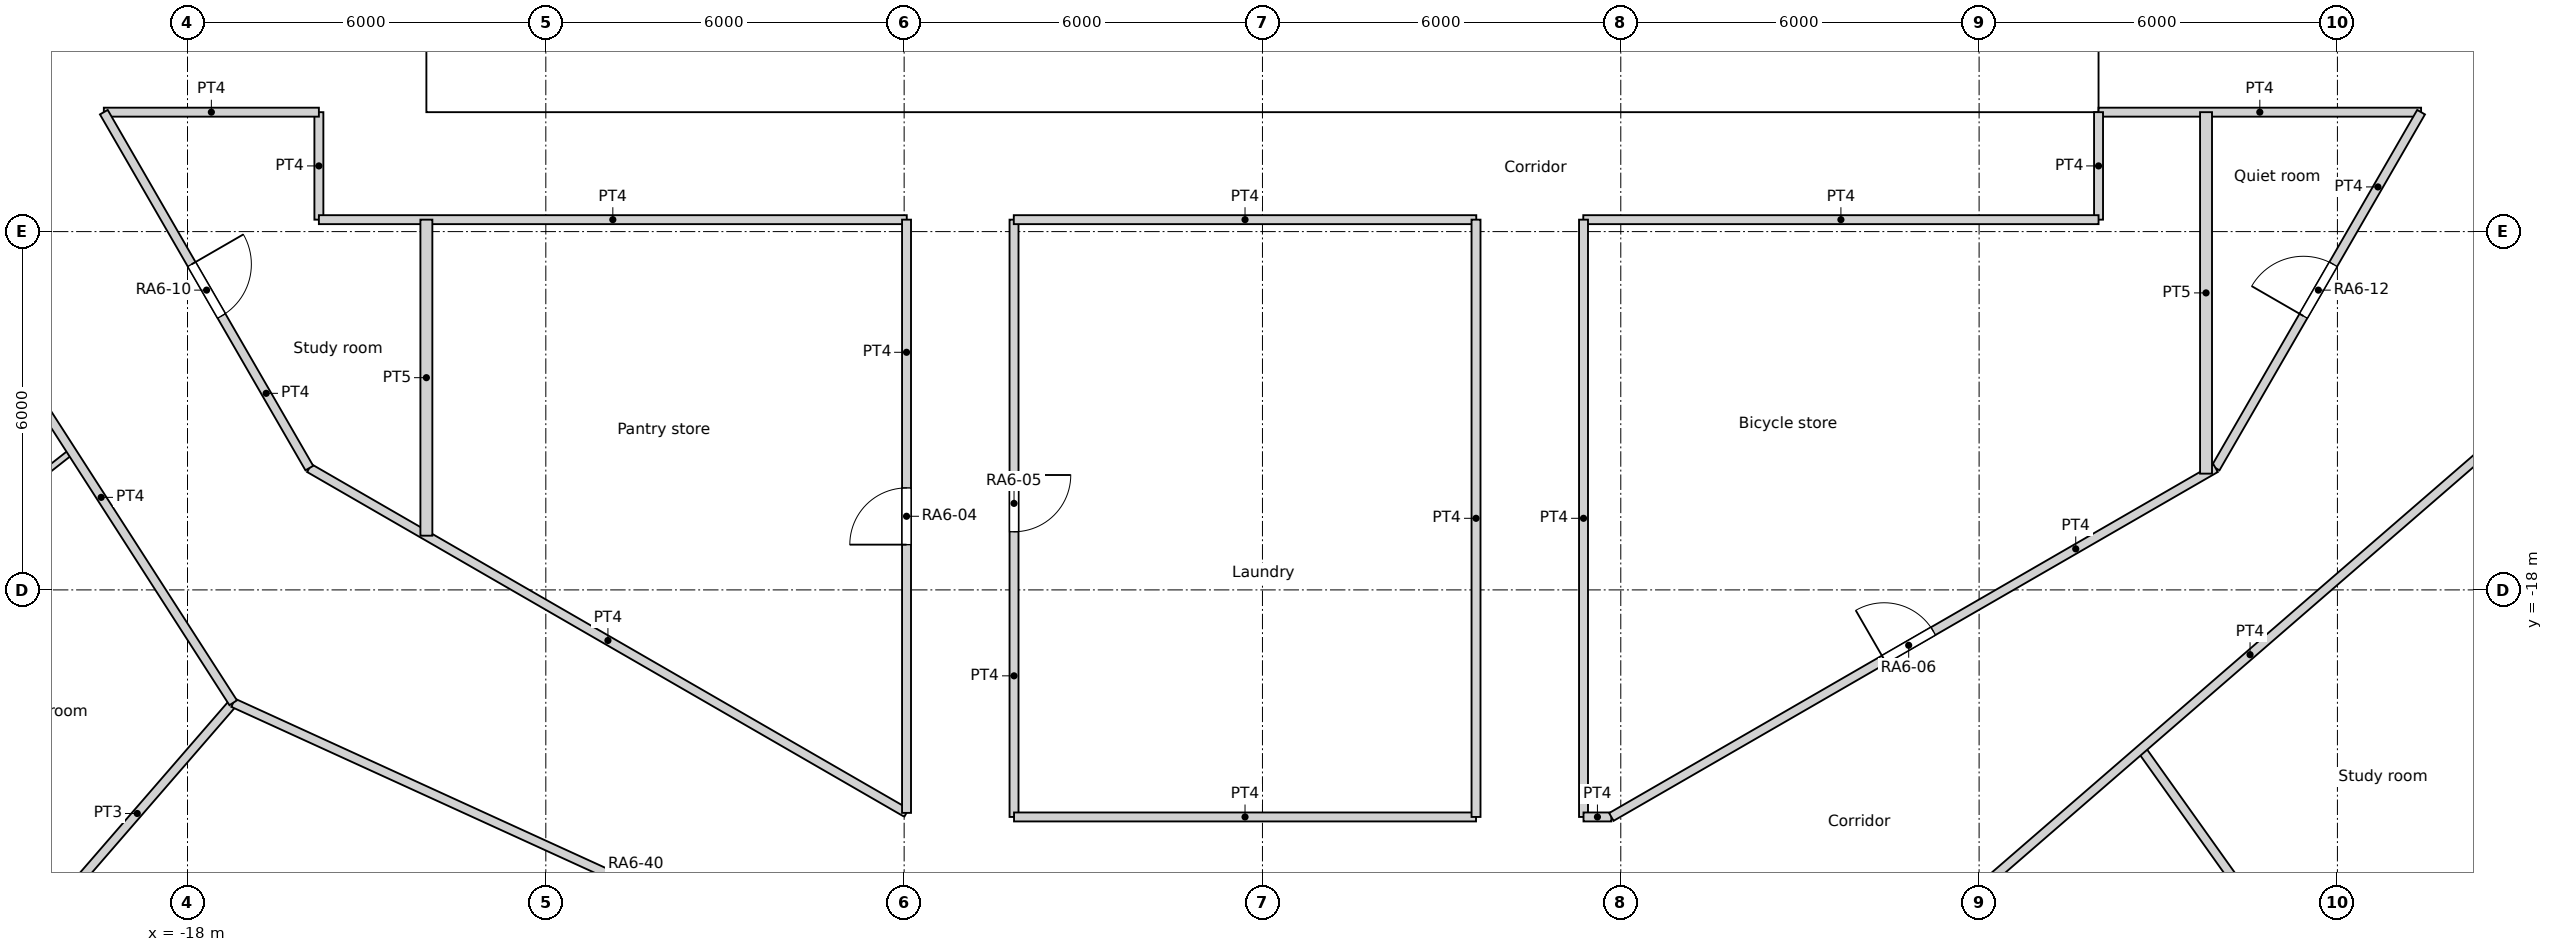
"""IFC4 building model, lengths in metres.
Left out: names, types, materials, properties, quantities, classifications, styles, units other than length and angle.
Written with IfcOpenShell. Run it as: python <this file> out.ifc"""

import sys

from ifc_helpers import new_model, si_unit, direction, frame, frame_2d, origin, origin_2d, place, context, subcontext, project, spatial, rectangle, circle, extrude, element, fill, save


model = new_model("IFC4")
c1 = context("Model", 3, precision=1e-05, world=origin(), true_north=direction((0.0, 1.0)))
c2 = subcontext(c1, "Body", "Model", "MODEL_VIEW")
j1 = project(units=[si_unit("LENGTHUNIT", "METRE"), si_unit("PLANEANGLEUNIT", "RADIAN")], contexts=[c1])
p1 = place(None, origin())
s1 = spatial("IfcSite", under=j1, at=p1, CompositionType="ELEMENT")
p2 = place(p1, origin())
s2 = spatial("IfcBuilding", under=s1, at=p2, CompositionType="ELEMENT")
p3 = place(p2, frame((0.0, 0.0, 82.2)))
s3 = spatial("IfcBuildingStorey", under=s2, at=p3, CompositionType="ELEMENT", Elevation=82.2)
p4 = place(p3, frame((-19.826, -22.88, 0.0), z_axis=(0.0, 0.0, 1.0), x_axis=(1.0, 0.0, 0.0)))
e1 = element("IfcColumn", 1, at=p4, inside=s3, PredefinedType="COLUMN", context=c2, shape_type="SweptSolid", body=[
    extrude(circle(Radius=0.6, at=origin_2d()), origin(), (0.0, 0.0, 1.0), 3.6),
])
for number, where, z_axis, x_axis in (
    (2, (-20.509, -13.489, 0.0), (0.0, 0.0, 1.0), (1.0, 0.0, 0.0)),
    (3, (-16.846, -17.855, 0.0), (0.0, 0.0, 1.0), (1.0, 0.0, 0.0)),
    (4, (-12.274, -21.259, 0.0), (0.0, 0.0, 1.0), (1.0, 0.0, 0.0)),
    (5, (9.723, -22.54, 0.0), (0.0, 0.0, 1.0), (1.0, 0.0, 0.0)),
    (6, (14.659, -19.69, 0.0), (0.0, 0.0, 1.0), (1.0, 0.0, 0.0)),
    (7, (18.805, -15.779, 0.0), (0.0, 0.0, 1.0), (1.0, 0.0, 0.0)),
):
    element("IfcColumn", number, at=place(p3, frame(where, z_axis=z_axis, x_axis=x_axis)), inside=s3, PredefinedType="COLUMN", context=c2, shape_type="SweptSolid", body=[
        extrude(circle(Radius=0.65, at=origin_2d()), origin(), (0.0, 0.0, 1.0), 3.6),
    ])
for number, where, z_axis, x_axis in (
    (8, (-13.798, -12.802, 0.0), (0.0, 0.0, 1.0), (1.0, 0.0, 0.0)),
    (9, (-9.411, -16.301, 0.0), (0.0, 0.0, 1.0), (1.0, 0.0, 0.0)),
    (10, (-4.188, -18.35, 0.0), (0.0, 0.0, 1.0), (1.0, 0.0, 0.0)),
    (11, (1.406, -18.77, 0.0), (0.0, 0.0, 1.0), (1.0, 0.0, 0.0)),
    (12, (6.876, -17.521, 0.0), (0.0, 0.0, 1.0), (1.0, 0.0, 0.0)),
    (13, (11.735, -14.716, 0.0), (0.0, 0.0, 1.0), (1.0, 0.0, 0.0)),
    (14, (15.552, -10.603, 0.0), (0.0, 0.0, 1.0), (1.0, 0.0, 0.0)),
):
    element("IfcColumn", number, at=place(p3, frame(where, z_axis=z_axis, x_axis=x_axis)), inside=s3, PredefinedType="COLUMN", context=c2, shape_type="SweptSolid", body=[
        extrude(circle(Radius=0.7, at=origin_2d()), origin(), (0.0, 0.0, 1.0), 3.6),
    ])
p5 = place(p3, frame((-14.0, -9.4, 0.0), z_axis=(0.0, 0.0, 1.0), x_axis=(1.0, 0.0, 0.0)))
e15 = element("IfcWall", 15, at=p5, inside=s3, PredefinedType="SOLIDWALL", context=c2, shape_type="SweptSolid", body=[
    extrude(rectangle(XDim=28.0, YDim=1.2, at=frame_2d((14.0, 0.0))), origin(), (0.0, 0.0, 1.0), 3.6),
])
p6 = place(p5, frame((14.9, 0.0, 0.0)))
e16 = element("IfcOpeningElement", 16, at=p6, cuts=e15, PredefinedType="OPENING", context=c2, shape_type="SweptSolid", body=[
    extrude(rectangle(XDim=1.0, YDim=2.1, at=frame_2d((0.5, 1.05))), frame((0.0, 0.6, 0.0), z_axis=(0.0, -1.0, 0.0), x_axis=(1.0, 0.0, 0.0)), (0.0, 0.0, 1.0), 1.2),
])
p7 = place(p5, frame((9.8, 0.0, 0.0)))
e17 = element("IfcOpeningElement", 17, at=p7, cuts=e15, PredefinedType="OPENING", context=c2, shape_type="SweptSolid", body=[
    extrude(rectangle(XDim=1.8, YDim=2.1, at=frame_2d((0.9, 1.05))), frame((0.0, 0.6, 0.0), z_axis=(0.0, -1.0, 0.0), x_axis=(1.0, 0.0, 0.0)), (0.0, 0.0, 1.0), 1.2),
])
p8 = place(p5, frame((16.4, 0.0, 0.0)))
e18 = element("IfcOpeningElement", 18, at=p8, cuts=e15, PredefinedType="OPENING", context=c2, shape_type="SweptSolid", body=[
    extrude(rectangle(XDim=1.8, YDim=2.1, at=frame_2d((0.9, 1.05))), frame((0.0, 0.6, 0.0), z_axis=(0.0, -1.0, 0.0), x_axis=(1.0, 0.0, 0.0)), (0.0, 0.0, 1.0), 1.2),
])
p9 = place(p3, frame((-15.8, -11.8, 0.0), z_axis=(0.0, 0.0, 1.0), x_axis=(1.0, 0.0, 0.0)))
e19 = element("IfcWall", 19, at=p9, inside=s3, PredefinedType="PARTITIONING", context=c2, shape_type="SweptSolid", body=[
    extrude(rectangle(XDim=9.844, YDim=0.15, at=frame_2d((4.922, 0.0))), origin(), (0.0, 0.0, 1.0), 3.15),
])
p10 = place(p3, frame((-4.164, -11.8, 0.0), z_axis=(0.0, 0.0, 1.0), x_axis=(1.0, 0.0, 0.0)))
e20 = element("IfcWall", 20, at=p10, inside=s3, PredefinedType="PARTITIONING", context=c2, shape_type="SweptSolid", body=[
    extrude(rectangle(XDim=7.744, YDim=0.15, at=frame_2d((3.872, 0.0))), origin(), (0.0, 0.0, 1.0), 3.15),
])
p11 = place(p3, frame((14.0, -11.8, 0.0), z_axis=(0.0, 0.0, 1.0), x_axis=(0.0, 1.0, 0.0)))
e21 = element("IfcWall", 21, at=p11, inside=s3, PredefinedType="PARTITIONING", context=c2, shape_type="SweptSolid", body=[
    extrude(rectangle(XDim=1.8, YDim=0.15, at=frame_2d((0.9, 0.0))), origin(), (0.0, 0.0, 1.0), 3.15),
])
p12 = place(p3, frame((5.372, -11.8, 0.0), z_axis=(0.0, 0.0, 1.0), x_axis=(1.0, 0.0, 0.0)))
e22 = element("IfcWall", 22, at=p12, inside=s3, PredefinedType="PARTITIONING", context=c2, shape_type="SweptSolid", body=[
    extrude(rectangle(XDim=8.628, YDim=0.15, at=frame_2d((4.314, 0.0))), origin(), (0.0, 0.0, 1.0), 3.15),
])
p13 = place(p3, frame((-15.8, -11.8, 0.0), z_axis=(0.0, 0.0, 1.0), x_axis=(0.0, 1.0, 0.0)))
e23 = element("IfcWall", 23, at=p13, inside=s3, PredefinedType="PARTITIONING", context=c2, shape_type="SweptSolid", body=[
    extrude(rectangle(XDim=1.8, YDim=0.15, at=frame_2d((0.9, 0.0))), origin(), (0.0, 0.0, 1.0), 3.15),
])
p14 = place(p3, frame((14.0, -10.0, 0.0), z_axis=(0.0, 0.0, 1.0), x_axis=(1.0, 0.0, 0.0)))
e24 = element("IfcWall", 24, at=p14, inside=s3, PredefinedType="PARTITIONING", context=c2, shape_type="SweptSolid", body=[
    extrude(rectangle(XDim=5.401, YDim=0.15, at=frame_2d((2.7, 0.0))), origin(), (0.0, 0.0, 1.0), 3.15),
])
p15 = place(p3, frame((15.96, -15.96, 0.0), z_axis=(0.0, 0.0, 1.0), x_axis=(0.499992689227, 0.86602962462, 0.0)))
e25 = element("IfcWall", 25, at=p15, inside=s3, PredefinedType="PARTITIONING", context=c2, shape_type="SweptSolid", body=[
    extrude(rectangle(XDim=6.882, YDim=0.15, at=frame_2d((3.441, 0.0))), origin(), (0.0, 0.0, 1.0), 3.15),
])
p16 = place(p15, frame((2.941, 0.0, 0.0)))
e26 = element("IfcOpeningElement", 26, at=p16, cuts=e25, PredefinedType="OPENING", context=c2, shape_type="SweptSolid", body=[
    extrude(rectangle(XDim=1.0, YDim=2.04, at=frame_2d((0.5, 1.02))), frame((0.0, 0.075, 0.0), z_axis=(0.0, -1.0, 0.0), x_axis=(1.0, 0.0, 0.0)), (0.0, 0.0, 1.0), 0.15),
])
p17 = place(p3, frame((10.933, -23.94, 0.0), z_axis=(0.0, 0.0, 1.0), x_axis=(0.755770011705, 0.654837147242, 0.0)))
e27 = element("IfcWall", 27, at=p17, inside=s3, PredefinedType="PARTITIONING", context=c2, shape_type="SweptSolid", body=[
    extrude(rectangle(XDim=14.83, YDim=0.15, at=frame_2d((7.415, 0.0))), origin(), (0.0, 0.0, 1.0), 3.15),
])
p18 = place(p3, frame((-19.401, -10.0, 0.0), z_axis=(0.0, 0.0, 1.0), x_axis=(1.0, 0.0, 0.0)))
e28 = element("IfcWall", 28, at=p18, inside=s3, PredefinedType="PARTITIONING", context=c2, shape_type="SweptSolid", body=[
    extrude(rectangle(XDim=3.601, YDim=0.15, at=frame_2d((1.8, 0.0))), origin(), (0.0, 0.0, 1.0), 3.15),
])
p19 = place(p3, frame((-19.401, -10.0, 0.0), z_axis=(0.0, 0.0, 1.0), x_axis=(0.499992689227, -0.86602962462, 0.0)))
e29 = element("IfcWall", 29, at=p19, inside=s3, PredefinedType="PARTITIONING", context=c2, shape_type="SweptSolid", body=[
    extrude(rectangle(XDim=6.882, YDim=0.15, at=frame_2d((3.441, 0.0))), origin(), (0.0, 0.0, 1.0), 3.15),
])
p20 = place(p19, frame((2.941, 0.0, 0.0)))
e30 = element("IfcOpeningElement", 30, at=p20, cuts=e29, PredefinedType="OPENING", context=c2, shape_type="SweptSolid", body=[
    extrude(rectangle(XDim=1.0, YDim=2.04, at=frame_2d((0.5, 1.02))), frame((0.0, 0.075, 0.0), z_axis=(0.0, -1.0, 0.0), x_axis=(1.0, 0.0, 0.0)), (0.0, 0.0, 1.0), 0.15),
])
p21 = place(p3, frame((-25.253, -7.415, 0.0), z_axis=(0.0, 0.0, 1.0), x_axis=(0.540667724156, -0.841236240337, 0.0)))
e31 = element("IfcWall", 31, at=p21, inside=s3, PredefinedType="PARTITIONING", context=c2, shape_type="SweptSolid", body=[
    extrude(rectangle(XDim=14.83, YDim=0.15, at=frame_2d((7.415, 0.0))), origin(), (0.0, 0.0, 1.0), 3.15),
])
p22 = place(p21, frame((5.602, 0.0, 0.0)))
e32 = element("IfcOpeningElement", 32, at=p22, cuts=e31, PredefinedType="OPENING", context=c2, shape_type="SweptSolid", body=[
    extrude(rectangle(XDim=1.0, YDim=2.1, at=frame_2d((0.5, 1.05))), frame((0.0, 0.075, 0.0), z_axis=(0.0, -1.0, 0.0), x_axis=(1.0, 0.0, 0.0)), (0.0, 0.0, 1.0), 0.15),
])
p23 = place(p3, frame((-15.96, -15.96, 0.0), z_axis=(0.0, 0.0, 1.0), x_axis=(0.86602397904, -0.500002467721, 0.0)))
e33 = element("IfcWall", 33, at=p23, inside=s3, PredefinedType="PARTITIONING", context=c2, shape_type="SweptSolid", body=[
    extrude(rectangle(XDim=11.547, YDim=0.15, at=frame_2d((5.774, 0.0))), origin(), (0.0, 0.0, 1.0), 3.15),
])
p24 = place(p3, frame((-5.96, -21.734, 0.0), z_axis=(0.0, 0.0, 1.0), x_axis=(0.0, 1.0, 0.0)))
e34 = element("IfcWall", 34, at=p24, inside=s3, PredefinedType="PARTITIONING", context=c2, shape_type="SweptSolid", body=[
    extrude(rectangle(XDim=9.934, YDim=0.15, at=frame_2d((4.967, 0.0))), origin(), (0.0, 0.0, 1.0), 3.15),
])
p25 = place(p24, frame((4.492, 0.0, 0.0)))
e35 = element("IfcOpeningElement", 35, at=p25, cuts=e34, PredefinedType="OPENING", context=c2, shape_type="SweptSolid", body=[
    extrude(rectangle(XDim=0.95, YDim=2.1, at=frame_2d((0.475, 1.05))), frame((0.0, 0.075, 0.0), z_axis=(0.0, -1.0, 0.0), x_axis=(1.0, 0.0, 0.0)), (0.0, 0.0, 1.0), 0.15),
])
p26 = place(p3, frame((-4.16, -21.802, 0.0), z_axis=(0.0, 0.0, 1.0), x_axis=(0.0, 1.0, 0.0)))
e36 = element("IfcWall", 36, at=p26, inside=s3, PredefinedType="PARTITIONING", context=c2, shape_type="SweptSolid", body=[
    extrude(rectangle(XDim=10.002, YDim=0.15, at=frame_2d((5.001, 0.0))), origin(), (0.0, 0.0, 1.0), 3.15),
])
p27 = place(p26, frame((4.776, 0.0, 0.0)))
e37 = element("IfcOpeningElement", 37, at=p27, cuts=e36, PredefinedType="OPENING", context=c2, shape_type="SweptSolid", body=[
    extrude(rectangle(XDim=0.95, YDim=2.1, at=frame_2d((0.475, 1.05))), frame((0.0, 0.075, 0.0), z_axis=(0.0, -1.0, 0.0), x_axis=(1.0, 0.0, 0.0)), (0.0, 0.0, 1.0), 0.15),
])
p28 = place(p3, frame((-4.16, -21.802, 0.0), z_axis=(0.0, 0.0, 1.0), x_axis=(1.0, 0.0, 0.0)))
e38 = element("IfcWall", 38, at=p28, inside=s3, PredefinedType="PARTITIONING", context=c2, shape_type="SweptSolid", body=[
    extrude(rectangle(XDim=7.736, YDim=0.15, at=frame_2d((3.868, 0.0))), origin(), (0.0, 0.0, 1.0), 3.15),
])
for number, where, z_axis, x_axis in (
    (39, (3.576, -21.802, 0.0), (0.0, 0.0, 1.0), (0.0, 1.0, 0.0)),
    (40, (5.376, -21.802, 0.0), (0.0, 0.0, 1.0), (0.0, 1.0, 0.0)),
):
    element("IfcWall", number, at=place(p3, frame(where, z_axis=z_axis, x_axis=x_axis)), inside=s3, PredefinedType="PARTITIONING", context=c2, shape_type="SweptSolid", body=[
        extrude(rectangle(XDim=10.002, YDim=0.15, at=frame_2d((5.001, 0.0))), origin(), (0.0, 0.0, 1.0), 3.15),
    ])
p29 = place(p3, frame((5.376, -21.802, 0.0), z_axis=(0.0, 0.0, 1.0), x_axis=(1.0, 0.0, 0.0)))
e41 = element("IfcWall", 41, at=p29, inside=s3, PredefinedType="PARTITIONING", context=c2, shape_type="SweptSolid", body=[
    extrude(rectangle(XDim=0.466, YDim=0.15, at=frame_2d((0.233, 0.0))), origin(), (0.0, 0.0, 1.0), 3.15),
])
p30 = place(p3, frame((5.842, -21.802, 0.0), z_axis=(0.0, 0.0, 1.0), x_axis=(0.866031778836, 0.499988957924, 0.0)))
e42 = element("IfcWall", 42, at=p30, inside=s3, PredefinedType="PARTITIONING", context=c2, shape_type="SweptSolid", body=[
    extrude(rectangle(XDim=11.683, YDim=0.15, at=frame_2d((5.842, 0.0))), origin(), (0.0, 0.0, 1.0), 3.15),
])
p31 = place(p30, frame((5.274, 0.0, 0.0)))
e43 = element("IfcOpeningElement", 43, at=p31, cuts=e42, PredefinedType="OPENING", context=c2, shape_type="SweptSolid", body=[
    extrude(rectangle(XDim=0.95, YDim=2.1, at=frame_2d((0.475, 1.05))), frame((0.0, 0.075, 0.0), z_axis=(0.0, -1.0, 0.0), x_axis=(1.0, 0.0, 0.0)), (0.0, 0.0, 1.0), 0.15),
])
p32 = place(p3, frame((-17.235, -19.89, 0.0), z_axis=(0.0, 0.0, 1.0), x_axis=(0.90960889055, -0.415465601743, 0.0)))
e44 = element("IfcWall", 44, at=p32, inside=s3, PredefinedType="PARTITIONING", context=c2, shape_type="SweptSolid", body=[
    extrude(rectangle(XDim=14.829, YDim=0.15, at=frame_2d((7.415, 0.0))), origin(), (0.0, 0.0, 1.0), 3.15),
])
p33 = place(p32, frame((6.914, 0.0, 0.0)))
e45 = element("IfcOpeningElement", 45, at=p33, cuts=e44, PredefinedType="OPENING", context=c2, shape_type="SweptSolid", body=[
    extrude(rectangle(XDim=1.0, YDim=2.04, at=frame_2d((0.5, 1.02))), frame((0.0, 0.075, 0.0), z_axis=(0.0, -1.0, 0.0), x_axis=(1.0, 0.0, 0.0)), (0.0, 0.0, 1.0), 0.15),
])
p34 = place(p3, frame((-14.0, -17.092, 0.0), z_axis=(0.0, 0.0, 1.0), x_axis=(0.0, 1.0, 0.0)))
e46 = element("IfcWall", 46, at=p34, inside=s3, PredefinedType="PARTITIONING", context=c2, shape_type="SweptSolid", body=[
    extrude(rectangle(XDim=5.292, YDim=0.2, at=frame_2d((2.646, 0.0))), origin(), (0.0, 0.0, 1.0), 3.15),
])
p35 = place(p3, frame((15.8, -16.053, 0.0), z_axis=(0.0, 0.0, 1.0), x_axis=(0.0, 1.0, 0.0)))
e47 = element("IfcWall", 47, at=p35, inside=s3, PredefinedType="PARTITIONING", context=c2, shape_type="SweptSolid", body=[
    extrude(rectangle(XDim=6.053, YDim=0.2, at=frame_2d((3.026, 0.0))), origin(), (0.0, 0.0, 1.0), 3.15),
])
p36 = place(p3, frame((-21.647, -17.023, 0.0), z_axis=(0.0, 0.0, 1.0), x_axis=(0.786138836794, 0.618049940769, 0.0)))
e48 = element("IfcWall", 48, at=p36, inside=s3, PredefinedType="PARTITIONING", context=c2, shape_type="SweptSolid", body=[
    extrude(rectangle(XDim=2.171, YDim=0.1, at=frame_2d((1.086, 0.0))), origin(), (0.0, 0.0, 1.0), 3.15),
])
p37 = place(p3, frame((-20.448, -23.598, 0.0), z_axis=(0.0, 0.0, 1.0), x_axis=(0.654847179409, 0.755761319214, 0.0)))
e49 = element("IfcWall", 49, at=p37, inside=s3, PredefinedType="PARTITIONING", context=c2, shape_type="SweptSolid", body=[
    extrude(rectangle(XDim=4.906, YDim=0.15, at=frame_2d((2.453, 0.0))), origin(), (0.0, 0.0, 1.0), 3.15),
])
p38 = place(p3, frame((14.715, -20.664, 0.0), z_axis=(0.0, 0.0, 1.0), x_axis=(0.580007254017, -0.814611309329, 0.0)))
e50 = element("IfcWall", 50, at=p38, inside=s3, PredefinedType="PARTITIONING", context=c2, shape_type="SweptSolid", body=[
    extrude(rectangle(XDim=5.857, YDim=0.15, at=frame_2d((2.928, 0.0))), origin(), (0.0, 0.0, 1.0), 3.15),
])
p39 = place(p6, origin())
e51 = element("IfcDoor", 51, at=p39, inside=s3, OperationType="SINGLE_SWING_LEFT", PredefinedType="DOOR", context=c2, shape_type="SweptSolid", body=[
    extrude(rectangle(XDim=1.0, YDim=2.1, at=frame_2d((0.5, 1.05))), frame((0.0, 0.025, 0.0), z_axis=(0.0, -1.0, 0.0), x_axis=(1.0, 0.0, 0.0)), (0.0, 0.0, 1.0), 0.05),
])
fill(e16, e51)
p40 = place(p7, origin())
e52 = element("IfcDoor", 52, at=p40, inside=s3, OperationType="DOUBLE_DOOR_SINGLE_SWING", PredefinedType="DOOR", context=c2, shape_type="SweptSolid", body=[
    extrude(rectangle(XDim=1.8, YDim=2.1, at=frame_2d((0.9, 1.05))), frame((0.0, 0.025, 0.0), z_axis=(0.0, -1.0, 0.0), x_axis=(1.0, 0.0, 0.0)), (0.0, 0.0, 1.0), 0.05),
])
fill(e17, e52)
p41 = place(p8, origin())
e53 = element("IfcDoor", 53, at=p41, inside=s3, OperationType="DOUBLE_DOOR_SINGLE_SWING", PredefinedType="DOOR", context=c2, shape_type="SweptSolid", body=[
    extrude(rectangle(XDim=1.8, YDim=2.1, at=frame_2d((0.9, 1.05))), frame((0.0, 0.025, 0.0), z_axis=(0.0, -1.0, 0.0), x_axis=(1.0, 0.0, 0.0)), (0.0, 0.0, 1.0), 0.05),
])
fill(e18, e53)
p42 = place(p25, origin())
e54 = element("IfcDoor", 54, at=p42, inside=s3, OperationType="SINGLE_SWING_LEFT", PredefinedType="DOOR", context=c2, shape_type="SweptSolid", body=[
    extrude(rectangle(XDim=0.95, YDim=2.1, at=frame_2d((0.475, 1.05))), frame((0.0, 0.025, 0.0), z_axis=(0.0, -1.0, 0.0), x_axis=(1.0, 0.0, 0.0)), (0.0, 0.0, 1.0), 0.05),
])
fill(e35, e54)
p43 = place(p27, origin())
e55 = element("IfcDoor", 55, at=p43, inside=s3, OperationType="SINGLE_SWING_LEFT", PredefinedType="DOOR", context=c2, shape_type="SweptSolid", body=[
    extrude(rectangle(XDim=0.95, YDim=2.1, at=frame_2d((0.475, 1.05))), frame((0.0, 0.025, 0.0), z_axis=(0.0, -1.0, 0.0), x_axis=(1.0, 0.0, 0.0)), (0.0, 0.0, 1.0), 0.05),
])
fill(e37, e55)
p44 = place(p31, origin())
e56 = element("IfcDoor", 56, at=p44, inside=s3, OperationType="SINGLE_SWING_LEFT", PredefinedType="DOOR", context=c2, shape_type="SweptSolid", body=[
    extrude(rectangle(XDim=0.95, YDim=2.1, at=frame_2d((0.475, 1.05))), frame((0.0, 0.025, 0.0), z_axis=(0.0, -1.0, 0.0), x_axis=(1.0, 0.0, 0.0)), (0.0, 0.0, 1.0), 0.05),
])
fill(e43, e56)
p45 = place(p20, origin())
e57 = element("IfcDoor", 57, at=p45, inside=s3, OperationType="SINGLE_SWING_LEFT", PredefinedType="DOOR", context=c2, shape_type="SweptSolid", body=[
    extrude(rectangle(XDim=1.0, YDim=2.04, at=frame_2d((0.5, 1.02))), frame((0.0, 0.025, 0.0), z_axis=(0.0, -1.0, 0.0), x_axis=(1.0, 0.0, 0.0)), (0.0, 0.0, 1.0), 0.05),
])
fill(e30, e57)
p46 = place(p16, origin())
e58 = element("IfcDoor", 58, at=p46, inside=s3, OperationType="SINGLE_SWING_LEFT", PredefinedType="DOOR", context=c2, shape_type="SweptSolid", body=[
    extrude(rectangle(XDim=1.0, YDim=2.04, at=frame_2d((0.5, 1.02))), frame((0.0, 0.025, 0.0), z_axis=(0.0, -1.0, 0.0), x_axis=(1.0, 0.0, 0.0)), (0.0, 0.0, 1.0), 0.05),
])
fill(e26, e58)
save(model, sys.argv[1])
